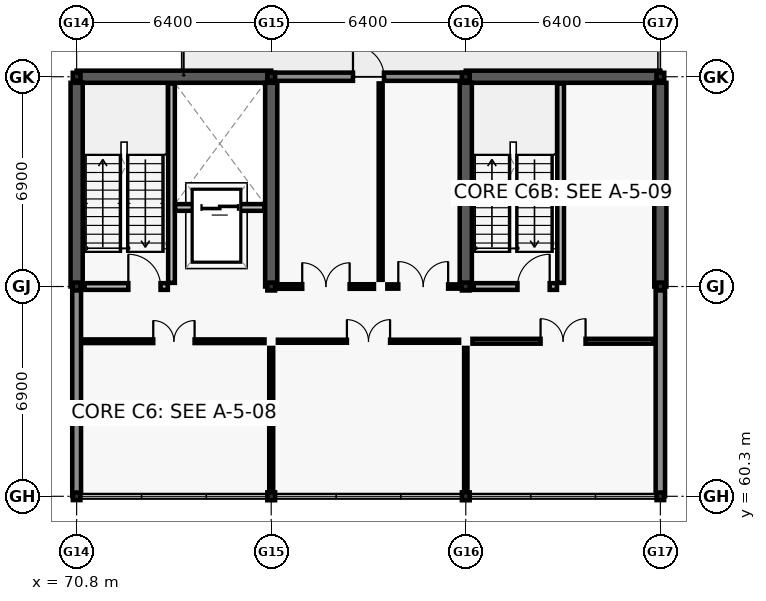
"""IFC4 building model, lengths in metres.
Left out: names, types, materials, properties, quantities, classifications, styles, units other than length and angle.
Written with IfcOpenShell. Run it as: python <this file> out.ifc"""

import sys

from ifc_helpers import new_model, si_unit, direction, frame, frame_2d, origin, origin_2d, place, context, subcontext, project, spatial, rectangle, hollow_rectangle, i_section, extrude, element, fill, save


model = new_model("IFC4")
c1 = context("Model", 3, precision=1e-05, world=origin(), true_north=direction((0.0, 1.0)))
c2 = subcontext(c1, "Body", "Model", "MODEL_VIEW")
j1 = project(units=[si_unit("LENGTHUNIT", "METRE"), si_unit("PLANEANGLEUNIT", "RADIAN")], contexts=[c1])
p1 = place(None, origin())
s1 = spatial("IfcSite", under=j1, at=p1, CompositionType="ELEMENT")
p2 = place(p1, origin())
s2 = spatial("IfcBuilding", under=s1, at=p2, CompositionType="ELEMENT")
p3 = place(p2, frame((0.0, 0.0, 21.3)))
s3 = spatial("IfcBuildingStorey", under=s2, at=p3, CompositionType="ELEMENT", Elevation=21.3)
p4 = place(p3, frame((70.8, 60.3, 0.0), z_axis=(0.0, 0.0, 1.0), x_axis=(1.0, 0.0, 0.0)))
e1 = element("IfcColumn", 1, at=p4, inside=s3, PredefinedType="COLUMN", context=c2, shape_type="SweptSolid", body=[
    extrude(hollow_rectangle(XDim=0.25, YDim=0.25, WallThickness=0.012, at=origin_2d()), origin(), (0.0, 0.0, 1.0), 3.9),
])
for number, where, z_axis, x_axis in (
    (2, (70.8, 67.2, 0.0), (0.0, 0.0, 1.0), (1.0, 0.0, 0.0)),
    (3, (70.8, 74.1, 0.0), (0.0, 0.0, 1.0), (1.0, 0.0, 0.0)),
    (4, (77.2, 60.3, 0.0), (0.0, 0.0, 1.0), (1.0, 0.0, 0.0)),
    (5, (77.2, 67.2, 0.0), (0.0, 0.0, 1.0), (1.0, 0.0, 0.0)),
    (6, (77.2, 74.1, 0.0), (0.0, 0.0, 1.0), (1.0, 0.0, 0.0)),
    (7, (83.6, 60.3, 0.0), (0.0, 0.0, 1.0), (1.0, 0.0, 0.0)),
    (8, (83.6, 67.2, 0.0), (0.0, 0.0, 1.0), (1.0, 0.0, 0.0)),
    (9, (83.6, 74.1, 0.0), (0.0, 0.0, 1.0), (1.0, 0.0, 0.0)),
):
    element("IfcColumn", number, at=place(p3, frame(where, z_axis=z_axis, x_axis=x_axis)), inside=s3, PredefinedType="COLUMN", context=c2, shape_type="SweptSolid", body=[
        extrude(i_section(OverallWidth=0.256, OverallDepth=0.26, WebThickness=0.01, FlangeThickness=0.017, FilletRadius=0.013, at=origin_2d()), origin(), (0.0, 0.0, 1.0), 3.9),
    ])
p5 = place(p3, frame((90.0, 60.3, 0.0), z_axis=(0.0, 0.0, 1.0), x_axis=(1.0, 0.0, 0.0)))
e10 = element("IfcColumn", 10, at=p5, inside=s3, PredefinedType="COLUMN", context=c2, shape_type="SweptSolid", body=[
    extrude(hollow_rectangle(XDim=0.25, YDim=0.25, WallThickness=0.012, at=origin_2d()), origin(), (0.0, 0.0, 1.0), 3.9),
])
for number, where, z_axis, x_axis in (
    (11, (90.0, 67.2, 0.0), (0.0, 0.0, 1.0), (1.0, 0.0, 0.0)),
    (12, (90.0, 74.1, 0.0), (0.0, 0.0, 1.0), (1.0, 0.0, 0.0)),
):
    element("IfcColumn", number, at=place(p3, frame(where, z_axis=z_axis, x_axis=x_axis)), inside=s3, PredefinedType="COLUMN", context=c2, shape_type="SweptSolid", body=[
        extrude(i_section(OverallWidth=0.256, OverallDepth=0.26, WebThickness=0.01, FlangeThickness=0.017, FilletRadius=0.013, at=origin_2d()), origin(), (0.0, 0.0, 1.0), 3.9),
    ])
p6 = place(p3, frame((70.8, 74.1, 0.0), z_axis=(0.0, 0.0, 1.0), x_axis=(1.0, 0.0, 0.0)))
e13 = element("IfcWall", 13, at=p6, inside=s3, PredefinedType="SHEAR", context=c2, shape_type="SweptSolid", body=[
    extrude(rectangle(XDim=6.4, YDim=0.4, at=frame_2d((3.2, 0.0))), origin(), (0.0, 0.0, 1.0), 3.66),
])
for number, where, z_axis, x_axis in (
    (14, (70.8, 67.2, 0.0), (0.0, 0.0, 1.0), (0.0, 1.0, 0.0)),
    (15, (77.2, 67.2, 0.0), (0.0, 0.0, 1.0), (0.0, 1.0, 0.0)),
):
    element("IfcWall", number, at=place(p3, frame(where, z_axis=z_axis, x_axis=x_axis)), inside=s3, PredefinedType="SHEAR", context=c2, shape_type="SweptSolid", body=[
        extrude(rectangle(XDim=6.7, YDim=0.4, at=frame_2d((3.35, 0.0))), origin(), (0.0, 0.0, 1.0), 3.66),
    ])
p7 = place(p3, frame((83.6, 74.1, 0.0), z_axis=(0.0, 0.0, 1.0), x_axis=(1.0, 0.0, 0.0)))
e16 = element("IfcWall", 16, at=p7, inside=s3, PredefinedType="SHEAR", context=c2, shape_type="SweptSolid", body=[
    extrude(rectangle(XDim=6.4, YDim=0.4, at=frame_2d((3.2, 0.0))), origin(), (0.0, 0.0, 1.0), 3.66),
])
for number, where, z_axis, x_axis in (
    (17, (83.6, 67.2, 0.0), (0.0, 0.0, 1.0), (0.0, 1.0, 0.0)),
    (18, (90.0, 67.2, 0.0), (0.0, 0.0, 1.0), (0.0, 1.0, 0.0)),
):
    element("IfcWall", number, at=place(p3, frame(where, z_axis=z_axis, x_axis=x_axis)), inside=s3, PredefinedType="SHEAR", context=c2, shape_type="SweptSolid", body=[
        extrude(rectangle(XDim=6.7, YDim=0.4, at=frame_2d((3.35, 0.0))), origin(), (0.0, 0.0, 1.0), 3.66),
    ])
p8 = place(p3, frame((77.205, 74.1, 0.0), z_axis=(0.0, 0.0, 1.0), x_axis=(1.0, 0.0, 0.0)))
e19 = element("IfcWall", 19, at=p8, inside=s3, PredefinedType="SOLIDWALL", context=c2, shape_type="SweptSolid", body=[
    extrude(rectangle(XDim=6.39, YDim=0.27, at=frame_2d((3.195, 0.0))), origin(), (0.0, 0.0, 1.0), 3.02),
])
p9 = place(p8, frame((2.685, 0.0, 0.0)))
e20 = element("IfcOpeningElement", 20, at=p9, cuts=e19, PredefinedType="OPENING", context=c2, shape_type="SweptSolid", body=[
    extrude(rectangle(XDim=1.02, YDim=2.14, at=frame_2d((0.51, 1.07))), frame((0.0, 0.145, 0.0), z_axis=(0.0, -1.0, 0.0), x_axis=(1.0, 0.0, 0.0)), (0.0, 0.0, 1.0), 0.29),
])
p10 = place(p3, frame((70.8, 60.305, 0.0), z_axis=(0.0, 0.0, 1.0), x_axis=(0.0, 1.0, 0.0)))
e21 = element("IfcWall", 21, at=p10, inside=s3, PredefinedType="SOLIDWALL", context=c2, shape_type="SweptSolid", body=[
    extrude(rectangle(XDim=6.89, YDim=0.29, at=frame_2d((3.445, 0.0))), origin(), (0.0, 0.0, 1.0), 3.02),
])
p11 = place(p3, frame((90.0, 67.195, 0.0), z_axis=(0.0, 0.0, 1.0), x_axis=(0.0, -1.0, 0.0)))
e22 = element("IfcWall", 22, at=p11, inside=s3, PredefinedType="SOLIDWALL", context=c2, shape_type="SweptSolid", body=[
    extrude(rectangle(XDim=6.89, YDim=0.31, at=frame_2d((3.445, 0.0))), origin(), (0.0, 0.0, 1.0), 3.02),
])
p12 = place(p3, frame((73.92, 67.32, 0.0), z_axis=(0.0, 0.0, 1.0), x_axis=(0.0, 1.0, 0.0)))
e23 = element("IfcWall", 23, at=p12, inside=s3, PredefinedType="SOLIDWALL", context=c2, shape_type="SweptSolid", body=[
    extrude(rectangle(XDim=6.555, YDim=0.22, at=frame_2d((3.277, 0.0))), origin(), (0.0, 0.0, 1.0), 3.66),
])
p13 = place(p3, frame((71.06, 67.2, 0.0), z_axis=(0.0, 0.0, 1.0), x_axis=(1.0, 0.0, 0.0)))
e24 = element("IfcWall", 24, at=p13, inside=s3, PredefinedType="SOLIDWALL", context=c2, shape_type="SweptSolid", body=[
    extrude(rectangle(XDim=2.74, YDim=0.22, at=frame_2d((1.37, 0.0))), origin(), (0.0, 0.0, 1.0), 3.02),
])
p14 = place(p13, frame((1.44, 0.0, 0.0)))
e25 = element("IfcOpeningElement", 25, at=p14, cuts=e24, PredefinedType="OPENING", context=c2, shape_type="SweptSolid", body=[
    extrude(rectangle(XDim=1.06, YDim=2.1, at=frame_2d((0.53, 1.05))), frame((0.0, 0.12, 0.0), z_axis=(0.0, -1.0, 0.0), x_axis=(1.0, 0.0, 0.0)), (0.0, 0.0, 1.0), 0.24),
])
p15 = place(p3, frame((74.04, 69.8, 0.0), z_axis=(0.0, 0.0, 1.0), x_axis=(1.0, 0.0, 0.0)))
e26 = element("IfcWall", 26, at=p15, inside=s3, PredefinedType="SOLIDWALL", context=c2, shape_type="SweptSolid", body=[
    extrude(rectangle(XDim=2.935, YDim=0.22, at=frame_2d((1.468, 0.0))), origin(), (0.0, 0.0, 1.0), 3.66),
])
p16 = place(p15, frame((0.867, 0.0, 0.0)))
e27 = element("IfcOpeningElement", 27, at=p16, cuts=e26, PredefinedType="OPENING", context=c2, shape_type="SweptSolid", body=[
    extrude(rectangle(XDim=1.2, YDim=2.15, at=frame_2d((0.6, 1.075))), frame((0.0, 0.12, 0.0), z_axis=(0.0, -1.0, 0.0), x_axis=(1.0, 0.0, 0.0)), (0.0, 0.0, 1.0), 0.24),
])
p17 = place(p3, frame((86.72, 67.32, 0.0), z_axis=(0.0, 0.0, 1.0), x_axis=(0.0, 1.0, 0.0)))
e28 = element("IfcWall", 28, at=p17, inside=s3, PredefinedType="SOLIDWALL", context=c2, shape_type="SweptSolid", body=[
    extrude(rectangle(XDim=6.555, YDim=0.22, at=frame_2d((3.277, 0.0))), origin(), (0.0, 0.0, 1.0), 3.66),
])
p18 = place(p3, frame((83.86, 67.2, 0.0), z_axis=(0.0, 0.0, 1.0), x_axis=(1.0, 0.0, 0.0)))
e29 = element("IfcWall", 29, at=p18, inside=s3, PredefinedType="SOLIDWALL", context=c2, shape_type="SweptSolid", body=[
    extrude(rectangle(XDim=2.74, YDim=0.22, at=frame_2d((1.37, 0.0))), origin(), (0.0, 0.0, 1.0), 3.02),
])
p19 = place(p18, frame((1.44, 0.0, 0.0)))
e30 = element("IfcOpeningElement", 30, at=p19, cuts=e29, PredefinedType="OPENING", context=c2, shape_type="SweptSolid", body=[
    extrude(rectangle(XDim=1.06, YDim=2.1, at=frame_2d((0.53, 1.05))), frame((0.0, 0.12, 0.0), z_axis=(0.0, -1.0, 0.0), x_axis=(1.0, 0.0, 0.0)), (0.0, 0.0, 1.0), 0.24),
])
p20 = place(p3, frame((77.2, 60.52, 0.0), z_axis=(0.0, 0.0, 1.0), x_axis=(0.0, 1.0, 0.0)))
e31 = element("IfcWall", 31, at=p20, inside=s3, PredefinedType="PARTITIONING", context=c2, shape_type="SweptSolid", body=[
    extrude(rectangle(XDim=4.66, YDim=0.13, at=frame_2d((2.33, 0.0))), origin(), (0.0, 0.0, 1.0), 3.0),
])
p21 = place(p3, frame((71.02, 65.4, 0.0), z_axis=(0.0, 0.0, 1.0), x_axis=(1.0, 0.0, 0.0)))
e32 = element("IfcWall", 32, at=p21, inside=s3, PredefinedType="PARTITIONING", context=c2, shape_type="SweptSolid", body=[
    extrude(rectangle(XDim=5.96, YDim=0.12, at=frame_2d((2.98, 0.0))), origin(), (0.0, 0.0, 1.0), 3.0),
])
p22 = place(p21, frame((2.3, 0.0, 0.0)))
e33 = element("IfcOpeningElement", 33, at=p22, cuts=e32, PredefinedType="OPENING", context=c2, shape_type="SweptSolid", body=[
    extrude(rectangle(XDim=1.36, YDim=2.15, at=frame_2d((0.68, 1.075))), frame((0.0, 0.07, 0.0), z_axis=(0.0, -1.0, 0.0), x_axis=(1.0, 0.0, 0.0)), (0.0, 0.0, 1.0), 0.14),
])
p23 = place(p3, frame((83.6, 60.52, 0.0), z_axis=(0.0, 0.0, 1.0), x_axis=(0.0, 1.0, 0.0)))
e34 = element("IfcWall", 34, at=p23, inside=s3, PredefinedType="PARTITIONING", context=c2, shape_type="SweptSolid", body=[
    extrude(rectangle(XDim=4.66, YDim=0.11, at=frame_2d((2.33, 0.0))), origin(), (0.0, 0.0, 1.0), 3.0),
])
p24 = place(p3, frame((77.42, 65.4, 0.0), z_axis=(0.0, 0.0, 1.0), x_axis=(1.0, 0.0, 0.0)))
e35 = element("IfcWall", 35, at=p24, inside=s3, PredefinedType="PARTITIONING", context=c2, shape_type="SweptSolid", body=[
    extrude(rectangle(XDim=5.96, YDim=0.1, at=frame_2d((2.98, 0.0))), origin(), (0.0, 0.0, 1.0), 3.0),
])
p25 = place(p24, frame((2.27, 0.0, 0.0)))
e36 = element("IfcOpeningElement", 36, at=p25, cuts=e35, PredefinedType="OPENING", context=c2, shape_type="SweptSolid", body=[
    extrude(rectangle(XDim=1.42, YDim=2.15, at=frame_2d((0.71, 1.075))), frame((0.0, 0.06, 0.0), z_axis=(0.0, -1.0, 0.0), x_axis=(1.0, 0.0, 0.0)), (0.0, 0.0, 1.0), 0.12),
])
p26 = place(p3, frame((83.82, 65.4, 0.0), z_axis=(0.0, 0.0, 1.0), x_axis=(1.0, 0.0, 0.0)))
e37 = element("IfcWall", 37, at=p26, inside=s3, PredefinedType="PARTITIONING", context=c2, shape_type="SweptSolid", body=[
    extrude(rectangle(XDim=5.96, YDim=0.16, at=frame_2d((2.98, 0.0))), origin(), (0.0, 0.0, 1.0), 3.0),
])
p27 = place(p26, frame((2.24, 0.0, 0.0)))
e38 = element("IfcOpeningElement", 38, at=p27, cuts=e37, PredefinedType="OPENING", context=c2, shape_type="SweptSolid", body=[
    extrude(rectangle(XDim=1.48, YDim=2.18, at=frame_2d((0.74, 1.09))), frame((0.0, 0.09, 0.0), z_axis=(0.0, -1.0, 0.0), x_axis=(1.0, 0.0, 0.0)), (0.0, 0.0, 1.0), 0.18),
])
p28 = place(p3, frame((77.42, 67.2, 0.0), z_axis=(0.0, 0.0, 1.0), x_axis=(1.0, 0.0, 0.0)))
e39 = element("IfcWall", 39, at=p28, inside=s3, PredefinedType="PARTITIONING", context=c2, shape_type="SweptSolid", body=[
    extrude(rectangle(XDim=3.16, YDim=0.15, at=frame_2d((1.58, 0.0))), origin(), (0.0, 0.0, 1.0), 3.0),
])
p29 = place(p28, frame((0.8, 0.0, 0.0)))
e40 = element("IfcOpeningElement", 40, at=p29, cuts=e39, PredefinedType="OPENING", context=c2, shape_type="SweptSolid", body=[
    extrude(rectangle(XDim=1.56, YDim=2.18, at=frame_2d((0.78, 1.09))), frame((0.0, 0.085, 0.0), z_axis=(0.0, -1.0, 0.0), x_axis=(1.0, 0.0, 0.0)), (0.0, 0.0, 1.0), 0.17),
])
p30 = place(p3, frame((81.02, 67.2, 0.0), z_axis=(0.0, 0.0, 1.0), x_axis=(1.0, 0.0, 0.0)))
e41 = element("IfcWall", 41, at=p30, inside=s3, PredefinedType="PARTITIONING", context=c2, shape_type="SweptSolid", body=[
    extrude(rectangle(XDim=2.36, YDim=0.14, at=frame_2d((1.18, 0.0))), origin(), (0.0, 0.0, 1.0), 3.0),
])
p31 = place(p30, frame((0.36, 0.0, 0.0)))
e42 = element("IfcOpeningElement", 42, at=p31, cuts=e41, PredefinedType="OPENING", context=c2, shape_type="SweptSolid", body=[
    extrude(rectangle(XDim=1.64, YDim=2.2, at=frame_2d((0.82, 1.1))), frame((0.0, 0.08, 0.0), z_axis=(0.0, -1.0, 0.0), x_axis=(1.0, 0.0, 0.0)), (0.0, 0.0, 1.0), 0.16),
])
p32 = place(p3, frame((80.8, 67.42, 0.0), z_axis=(0.0, 0.0, 1.0), x_axis=(0.0, 1.0, 0.0)))
e43 = element("IfcWall", 43, at=p32, inside=s3, PredefinedType="PARTITIONING", context=c2, shape_type="SweptSolid", body=[
    extrude(rectangle(XDim=6.46, YDim=0.13, at=frame_2d((3.23, 0.0))), origin(), (0.0, 0.0, 1.0), 3.0),
])
p33 = place(p9, origin())
e44 = element("IfcDoor", 44, at=p33, inside=s3, OperationType="SINGLE_SWING_LEFT", PredefinedType="DOOR", context=c2, shape_type="SweptSolid", body=[
    extrude(rectangle(XDim=1.02, YDim=2.14, at=frame_2d((0.51, 1.07))), frame((0.0, 0.025, 0.0), z_axis=(0.0, -1.0, 0.0), x_axis=(1.0, 0.0, 0.0)), (0.0, 0.0, 1.0), 0.05),
])
fill(e20, e44)
p34 = place(p14, origin())
e45 = element("IfcDoor", 45, at=p34, inside=s3, OperationType="SINGLE_SWING_LEFT", PredefinedType="DOOR", context=c2, shape_type="SweptSolid", body=[
    extrude(rectangle(XDim=1.06, YDim=2.1, at=frame_2d((0.53, 1.05))), frame((0.0, 0.025, 0.0), z_axis=(0.0, -1.0, 0.0), x_axis=(1.0, 0.0, 0.0)), (0.0, 0.0, 1.0), 0.05),
])
fill(e25, e45)
p35 = place(p16, origin())
e46 = element("IfcDoor", 46, at=p35, inside=s3, OperationType="DOUBLE_DOOR_SLIDING", PredefinedType="DOOR", context=c2, shape_type="SweptSolid", body=[
    extrude(rectangle(XDim=1.2, YDim=2.15, at=frame_2d((0.6, 1.075))), frame((0.0, 0.025, 0.0), z_axis=(0.0, -1.0, 0.0), x_axis=(1.0, 0.0, 0.0)), (0.0, 0.0, 1.0), 0.05),
])
fill(e27, e46)
p36 = place(p19, origin())
e47 = element("IfcDoor", 47, at=p36, inside=s3, OperationType="SINGLE_SWING_RIGHT", PredefinedType="DOOR", context=c2, shape_type="SweptSolid", body=[
    extrude(rectangle(XDim=1.06, YDim=2.1, at=frame_2d((0.53, 1.05))), frame((0.0, 0.025, 0.0), z_axis=(0.0, -1.0, 0.0), x_axis=(1.0, 0.0, 0.0)), (0.0, 0.0, 1.0), 0.05),
])
fill(e30, e47)
p37 = place(p22, origin())
e48 = element("IfcDoor", 48, at=p37, inside=s3, OperationType="DOUBLE_DOOR_SINGLE_SWING", PredefinedType="DOOR", context=c2, shape_type="SweptSolid", body=[
    extrude(rectangle(XDim=1.36, YDim=2.15, at=frame_2d((0.68, 1.075))), frame((0.0, 0.025, 0.0), z_axis=(0.0, -1.0, 0.0), x_axis=(1.0, 0.0, 0.0)), (0.0, 0.0, 1.0), 0.05),
])
fill(e33, e48)
p38 = place(p25, origin())
e49 = element("IfcDoor", 49, at=p38, inside=s3, OperationType="DOUBLE_DOOR_SINGLE_SWING", PredefinedType="DOOR", context=c2, shape_type="SweptSolid", body=[
    extrude(rectangle(XDim=1.42, YDim=2.15, at=frame_2d((0.71, 1.075))), frame((0.0, 0.025, 0.0), z_axis=(0.0, -1.0, 0.0), x_axis=(1.0, 0.0, 0.0)), (0.0, 0.0, 1.0), 0.05),
])
fill(e36, e49)
p39 = place(p27, origin())
e50 = element("IfcDoor", 50, at=p39, inside=s3, OperationType="DOUBLE_DOOR_SINGLE_SWING", PredefinedType="DOOR", context=c2, shape_type="SweptSolid", body=[
    extrude(rectangle(XDim=1.48, YDim=2.18, at=frame_2d((0.74, 1.09))), frame((0.0, 0.025, 0.0), z_axis=(0.0, -1.0, 0.0), x_axis=(1.0, 0.0, 0.0)), (0.0, 0.0, 1.0), 0.05),
])
fill(e38, e50)
p40 = place(p29, origin())
e51 = element("IfcDoor", 51, at=p40, inside=s3, OperationType="DOUBLE_DOOR_SINGLE_SWING", PredefinedType="DOOR", context=c2, shape_type="SweptSolid", body=[
    extrude(rectangle(XDim=1.56, YDim=2.18, at=frame_2d((0.78, 1.09))), frame((0.0, 0.025, 0.0), z_axis=(0.0, -1.0, 0.0), x_axis=(1.0, 0.0, 0.0)), (0.0, 0.0, 1.0), 0.05),
])
fill(e40, e51)
p41 = place(p31, origin())
e52 = element("IfcDoor", 52, at=p41, inside=s3, OperationType="DOUBLE_DOOR_SINGLE_SWING", PredefinedType="DOOR", context=c2, shape_type="SweptSolid", body=[
    extrude(rectangle(XDim=1.64, YDim=2.2, at=frame_2d((0.82, 1.1))), frame((0.0, 0.025, 0.0), z_axis=(0.0, -1.0, 0.0), x_axis=(1.0, 0.0, 0.0)), (0.0, 0.0, 1.0), 0.05),
])
fill(e42, e52)
save(model, sys.argv[1])
